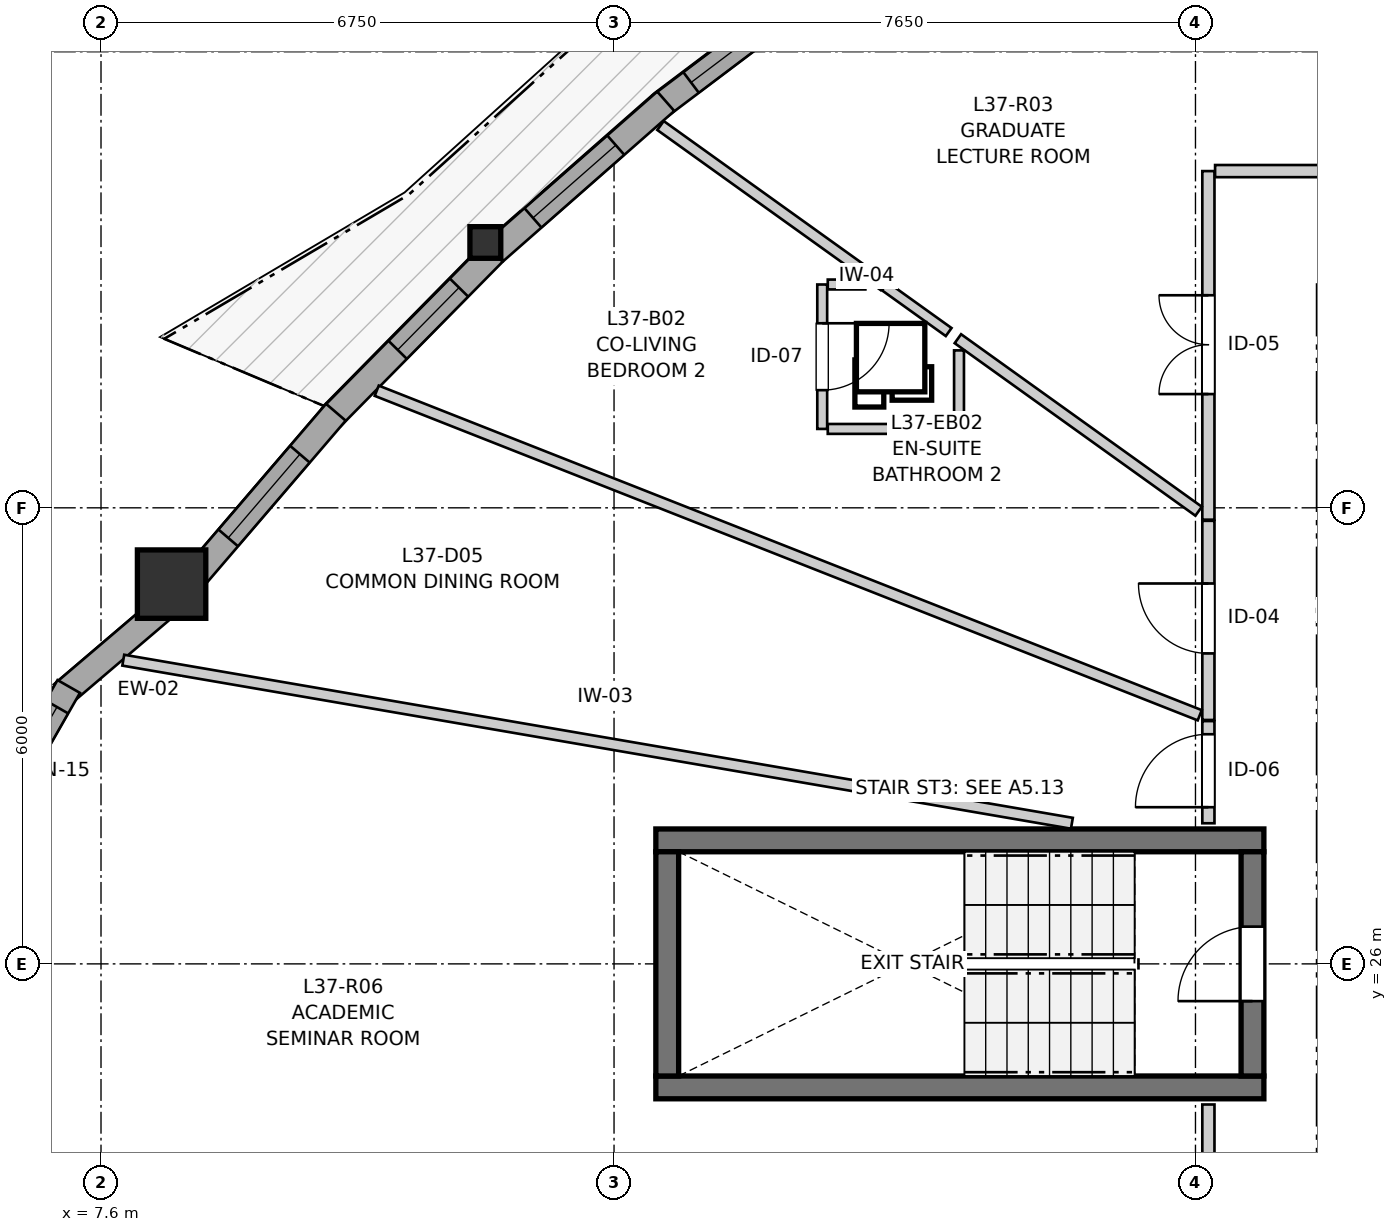
"""IFC4 building model, lengths in metres.
Left out: names, types, materials, properties, quantities, classifications, styles, units other than length and angle.
Written with IfcOpenShell. Run it as: python <this file> out.ifc"""

import sys

from ifc_helpers import new_model, si_unit, direction, frame, frame_2d, origin, origin_2d, place, context, subcontext, project, spatial, rectangle, i_section, extrude, source, transform, mapped, element, fill, save


model = new_model("IFC4")
c1 = context("Model", 3, precision=1e-05, world=origin(), true_north=direction((0.0, 1.0)))
c2 = subcontext(c1, "Body", "Model", "MODEL_VIEW")
j1 = project(units=[si_unit("LENGTHUNIT", "METRE"), si_unit("PLANEANGLEUNIT", "RADIAN")], contexts=[c1])
p1 = place(None, origin())
s1 = spatial("IfcSite", under=j1, at=p1, CompositionType="ELEMENT")
p2 = place(p1, origin())
s2 = spatial("IfcBuilding", under=s1, at=p2, CompositionType="ELEMENT")
p3 = place(p2, frame((0.0, 0.0, 124.8)))
s3 = spatial("IfcBuildingStorey", under=s2, at=p3, CompositionType="ELEMENT", Elevation=124.8)
for number, where, z_axis, x_axis in (
    (1, (14.9, 24.375, 0.0), (0.0, 0.0, 1.0), (1.0, 0.0, 0.0)),
    (2, (22.9, 27.625, 0.0), (0.0, 0.0, 1.0), (-1.0, 0.0, 0.0)),
):
    element("IfcWall", number, at=place(p3, frame(where, z_axis=z_axis, x_axis=x_axis)), inside=s3, PredefinedType="SHEAR", context=c2, shape_type="SweptSolid", body=[
        extrude(rectangle(XDim=8.0, YDim=0.3, at=frame_2d((4.0, 0.0))), origin(), (0.0, 0.0, 1.0), 2.9),
    ])
p4 = place(p3, frame((15.05, 27.475, 0.0), z_axis=(0.0, 0.0, 1.0), x_axis=(0.0, -1.0, 0.0)))
e3 = element("IfcWall", 3, at=p4, inside=s3, PredefinedType="SHEAR", context=c2, shape_type="SweptSolid", body=[
    extrude(rectangle(XDim=2.95, YDim=0.3, at=frame_2d((1.475, 0.0))), origin(), (0.0, 0.0, 1.0), 2.9),
])
p5 = place(p3, frame((22.75, 24.525, 0.0), z_axis=(0.0, 0.0, 1.0), x_axis=(0.0, 1.0, 0.0)))
e4 = element("IfcWall", 4, at=p5, inside=s3, PredefinedType="SHEAR", context=c2, shape_type="SweptSolid", body=[
    extrude(rectangle(XDim=2.95, YDim=0.3, at=frame_2d((1.475, 0.0))), origin(), (0.0, 0.0, 1.0), 2.9),
])
p6 = place(p5, frame((0.985, 0.0, 0.0)))
e5 = element("IfcOpeningElement", 5, at=p6, cuts=e4, PredefinedType="OPENING", context=c2, shape_type="SweptSolid", body=[
    extrude(rectangle(XDim=0.98, YDim=2.15, at=frame_2d((0.49, 1.075))), frame((0.0, 0.16, 0.0), z_axis=(0.0, -1.0, 0.0), x_axis=(1.0, 0.0, 0.0)), (0.0, 0.0, 1.0), 0.32),
])
m1 = source(origin(), c2, "Body", "SweptSolid", [
    extrude(rectangle(XDim=0.9, YDim=0.9, at=origin_2d()), origin(), (0.0, 0.0, 1.0), 2.9),
])
p7 = place(p3, frame((8.529, 30.996, 0.0), z_axis=(0.0, 0.0, 1.0), x_axis=(1.0, 0.0, 0.0)))
e6 = element("IfcColumn", 6, at=p7, inside=s3, PredefinedType="COLUMN", context=c2, shape_type="MappedRepresentation", body=[
    mapped(m1, transform((0.0, 0.0, 0.0), x_axis=(1.0, 0.0, 0.0), y_axis=(0.0, 1.0, 0.0), z_axis=(0.0, 0.0, 1.0), scale=1.0)),
])
m2 = source(origin(), c2, "Body", "SweptSolid", [
    extrude(i_section(OverallWidth=0.406, OverallDepth=0.416, WebThickness=0.027, FlangeThickness=0.044, FilletRadius=0.015, at=origin_2d()), origin(), (0.0, 0.0, 1.0), 2.9),
])
p8 = place(p3, frame((12.657, 35.491, 0.0), z_axis=(0.0, 0.0, 1.0), x_axis=(1.0, 0.0, 0.0)))
e7 = element("IfcColumn", 7, at=p8, inside=s3, PredefinedType="PILASTER", context=c2, shape_type="MappedRepresentation", body=[
    mapped(m2, transform((0.0, 0.0, 0.0), x_axis=(1.0, 0.0, 0.0), y_axis=(0.0, 1.0, 0.0), z_axis=(0.0, 0.0, 1.0), scale=1.0)),
])
p9 = place(p3, frame((8.464, 30.718, 0.0), z_axis=(0.0, 0.0, 1.0), x_axis=(-0.76120118347, -0.648515811899, 0.0)))
e8 = element("IfcWall", 8, at=p9, inside=s3, PredefinedType="SOLIDWALL", context=c2, shape_type="SweptSolid", body=[
    extrude(rectangle(XDim=1.805, YDim=0.34, at=frame_2d((0.902, 0.0))), origin(), (0.0, 0.0, 1.0), 2.43),
])
p10 = place(p3, frame((7.175, 29.65, 0.0), z_axis=(0.0, 0.0, 1.0), x_axis=(-0.495999400124, -0.868322863385, 0.0)))
e9 = element("IfcWall", 9, at=p10, inside=s3, PredefinedType="SOLIDWALL", context=c2, shape_type="SweptSolid", body=[
    extrude(rectangle(XDim=2.073, YDim=0.34, at=frame_2d((1.036, 0.0))), origin(), (0.0, 0.0, 1.0), 2.43),
])
p11 = place(p10, frame((0.311, 0.0, 0.82)))
e10 = element("IfcOpeningElement", 10, at=p11, cuts=e9, PredefinedType="OPENING", context=c2, shape_type="SweptSolid", body=[
    extrude(rectangle(XDim=1.45, YDim=1.25, at=frame_2d((0.725, 0.625))), frame((0.0, 0.18, 0.0), z_axis=(0.0, -1.0, 0.0), x_axis=(1.0, 0.0, 0.0)), (0.0, 0.0, 1.0), 0.36),
])
p12 = place(p3, frame((6.147, 24.15, 0.0), z_axis=(0.0, 0.0, 1.0), x_axis=(0.495999400124, -0.868322863385, 0.0)))
e11 = element("IfcWall", 11, at=p12, inside=s3, PredefinedType="SOLIDWALL", context=c2, shape_type="SweptSolid", body=[
    extrude(rectangle(XDim=2.073, YDim=0.34, at=frame_2d((1.036, 0.0))), origin(), (0.0, 0.0, 1.0), 2.43),
])
p13 = place(p12, frame((0.311, 0.0, 0.82)))
e12 = element("IfcOpeningElement", 12, at=p13, cuts=e11, PredefinedType="OPENING", context=c2, shape_type="SweptSolid", body=[
    extrude(rectangle(XDim=1.45, YDim=1.25, at=frame_2d((0.725, 0.625))), frame((0.0, 0.18, 0.0), z_axis=(0.0, -1.0, 0.0), x_axis=(1.0, 0.0, 0.0)), (0.0, 0.0, 1.0), 0.36),
])
p14 = place(p3, frame((17.154, 38.947, 0.0), z_axis=(0.0, 0.0, 1.0), x_axis=(-0.798332692302, -0.602216665663, 0.0)))
e13 = element("IfcWall", 13, at=p14, inside=s3, PredefinedType="SOLIDWALL", context=c2, shape_type="SweptSolid", body=[
    extrude(rectangle(XDim=2.746, YDim=0.34, at=frame_2d((1.373, 0.0))), origin(), (0.0, 0.0, 1.0), 2.43),
])
p15 = place(p14, frame((0.493, 0.0, 0.82)))
e14 = element("IfcOpeningElement", 14, at=p15, cuts=e13, PredefinedType="OPENING", context=c2, shape_type="SweptSolid", body=[
    extrude(rectangle(XDim=1.75, YDim=1.3, at=frame_2d((0.875, 0.65))), frame((0.0, 0.18, 0.0), z_axis=(0.0, -1.0, 0.0), x_axis=(1.0, 0.0, 0.0)), (0.0, 0.0, 1.0), 0.36),
])
p16 = place(p3, frame((15.031, 37.349, 0.0), z_axis=(0.0, 0.0, 1.0), x_axis=(-0.751472812955, -0.659764057364, 0.0)))
e15 = element("IfcWall", 15, at=p16, inside=s3, PredefinedType="SOLIDWALL", context=c2, shape_type="SweptSolid", body=[
    extrude(rectangle(XDim=2.99, YDim=0.34, at=frame_2d((1.495, 0.0))), origin(), (0.0, 0.0, 1.0), 2.43),
])
p17 = place(p16, frame((0.875, 0.0, 0.82)))
e16 = element("IfcOpeningElement", 16, at=p17, cuts=e15, PredefinedType="OPENING", context=c2, shape_type="SweptSolid", body=[
    extrude(rectangle(XDim=1.45, YDim=1.25, at=frame_2d((0.725, 0.625))), frame((0.0, 0.18, 0.0), z_axis=(0.0, -1.0, 0.0), x_axis=(1.0, 0.0, 0.0)), (0.0, 0.0, 1.0), 0.36),
])
p18 = place(p3, frame((12.764, 35.357, 0.0), z_axis=(0.0, 0.0, 1.0), x_axis=(-0.701906045867, -0.712269543625, 0.0)))
e17 = element("IfcWall", 17, at=p18, inside=s3, PredefinedType="SOLIDWALL", context=c2, shape_type="SweptSolid", body=[
    extrude(rectangle(XDim=3.039, YDim=0.34, at=frame_2d((1.52, 0.0))), origin(), (0.0, 0.0, 1.0), 2.43),
])
p19 = place(p18, frame((0.646, 0.0, 0.82)))
e18 = element("IfcOpeningElement", 18, at=p19, cuts=e17, PredefinedType="OPENING", context=c2, shape_type="SweptSolid", body=[
    extrude(rectangle(XDim=1.15, YDim=1.2, at=frame_2d((0.575, 0.6))), frame((0.0, 0.18, 0.0), z_axis=(0.0, -1.0, 0.0), x_axis=(1.0, 0.0, 0.0)), (0.0, 0.0, 1.0), 0.36),
])
p20 = place(p3, frame((10.69, 33.257, 0.0), z_axis=(0.0, 0.0, 1.0), x_axis=(-0.650763576187, -0.759280427714, 0.0)))
e19 = element("IfcWall", 19, at=p20, inside=s3, PredefinedType="SOLIDWALL", context=c2, shape_type="SweptSolid", body=[
    extrude(rectangle(XDim=2.893, YDim=0.34, at=frame_2d((1.447, 0.0))), origin(), (0.0, 0.0, 1.0), 2.43),
])
p21 = place(p20, frame((0.727, 0.0, 0.82)))
e20 = element("IfcOpeningElement", 20, at=p21, cuts=e19, PredefinedType="OPENING", context=c2, shape_type="SweptSolid", body=[
    extrude(rectangle(XDim=1.45, YDim=1.25, at=frame_2d((0.725, 0.625))), frame((0.0, 0.18, 0.0), z_axis=(0.0, -1.0, 0.0), x_axis=(1.0, 0.0, 0.0)), (0.0, 0.0, 1.0), 0.36),
])
p22 = place(p3, frame((22.17, 19.359, 0.0), z_axis=(0.0, 0.0, 1.0), x_axis=(0.0, 1.0, 0.0)))
e21 = element("IfcWall", 21, at=p22, inside=s3, PredefinedType="PARTITIONING", context=c2, shape_type="SweptSolid", body=[
    extrude(rectangle(XDim=4.791, YDim=0.16, at=frame_2d((2.396, 0.0))), origin(), (0.0, 0.0, 1.0), 2.9),
])
p23 = place(p22, frame((1.445, 0.0, 0.0)))
e22 = element("IfcOpeningElement", 22, at=p23, cuts=e21, PredefinedType="OPENING", context=c2, shape_type="SweptSolid", body=[
    extrude(rectangle(XDim=1.3, YDim=2.1, at=frame_2d((0.65, 1.05))), frame((0.0, 0.09, 0.0), z_axis=(0.0, -1.0, 0.0), x_axis=(1.0, 0.0, 0.0)), (0.0, 0.0, 1.0), 0.18),
])
p24 = place(p3, frame((22.17, 31.844, 0.0), z_axis=(0.0, 0.0, 1.0), x_axis=(0.0, 1.0, 0.0)))
e23 = element("IfcWall", 23, at=p24, inside=s3, PredefinedType="PARTITIONING", context=c2, shape_type="SweptSolid", body=[
    extrude(rectangle(XDim=4.586, YDim=0.16, at=frame_2d((2.293, 0.0))), origin(), (0.0, 0.0, 1.0), 2.9),
])
p25 = place(p24, frame((1.653, 0.0, 0.0)))
e24 = element("IfcOpeningElement", 24, at=p25, cuts=e23, PredefinedType="OPENING", context=c2, shape_type="SweptSolid", body=[
    extrude(rectangle(XDim=1.3, YDim=2.1, at=frame_2d((0.65, 1.05))), frame((0.0, 0.09, 0.0), z_axis=(0.0, -1.0, 0.0), x_axis=(1.0, 0.0, 0.0)), (0.0, 0.0, 1.0), 0.18),
])
p26 = place(p3, frame((22.17, 29.209, 0.0), z_axis=(0.0, 0.0, 1.0), x_axis=(0.0, 1.0, 0.0)))
e25 = element("IfcWall", 25, at=p26, inside=s3, PredefinedType="PARTITIONING", context=c2, shape_type="SweptSolid", body=[
    extrude(rectangle(XDim=2.62, YDim=0.16, at=frame_2d((1.31, 0.0))), origin(), (0.0, 0.0, 1.0), 2.9),
])
p27 = place(p26, frame((0.875, 0.0, 0.0)))
e26 = element("IfcOpeningElement", 26, at=p27, cuts=e25, PredefinedType="OPENING", context=c2, shape_type="SweptSolid", body=[
    extrude(rectangle(XDim=0.92, YDim=2.1, at=frame_2d((0.46, 1.05))), frame((0.0, 0.09, 0.0), z_axis=(0.0, -1.0, 0.0), x_axis=(1.0, 0.0, 0.0)), (0.0, 0.0, 1.0), 0.18),
])
p28 = place(p3, frame((17.089, 34.938, 0.0), z_axis=(0.0, 0.0, 1.0), x_axis=(0.0, -1.0, 0.0)))
e27 = element("IfcWall", 27, at=p28, inside=s3, PredefinedType="PARTITIONING", context=c2, shape_type="SweptSolid", body=[
    extrude(rectangle(XDim=1.9, YDim=0.13, at=frame_2d((0.95, 0.0))), origin(), (0.0, 0.0, 1.0), 2.9),
])
p29 = place(p28, frame((0.51, 0.0, 0.0)))
e28 = element("IfcOpeningElement", 28, at=p29, cuts=e27, PredefinedType="OPENING", context=c2, shape_type="SweptSolid", body=[
    extrude(rectangle(XDim=0.88, YDim=2.05, at=frame_2d((0.44, 1.025))), frame((0.0, 0.075, 0.0), z_axis=(0.0, -1.0, 0.0), x_axis=(1.0, 0.0, 0.0)), (0.0, 0.0, 1.0), 0.15),
])
p30 = place(p3, frame((22.17, 27.85, 0.0), z_axis=(0.0, 0.0, 1.0), x_axis=(0.0, 1.0, 0.0)))
e29 = element("IfcWall", 29, at=p30, inside=s3, PredefinedType="PARTITIONING", context=c2, shape_type="SweptSolid", body=[
    extrude(rectangle(XDim=1.344, YDim=0.16, at=frame_2d((0.672, 0.0))), origin(), (0.0, 0.0, 1.0), 2.9),
])
p31 = place(p30, frame((0.211, 0.0, 0.0)))
e30 = element("IfcOpeningElement", 30, at=p31, cuts=e29, PredefinedType="OPENING", context=c2, shape_type="SweptSolid", body=[
    extrude(rectangle(XDim=0.96, YDim=2.1, at=frame_2d((0.48, 1.05))), frame((0.0, 0.09, 0.0), z_axis=(0.0, -1.0, 0.0), x_axis=(1.0, 0.0, 0.0)), (0.0, 0.0, 1.0), 0.18),
])
p32 = place(p3, frame((7.893, 29.996, 0.0), z_axis=(0.0, 0.0, 1.0), x_axis=(0.985544917876, -0.169414328938, 0.0)))
e31 = element("IfcWall", 31, at=p32, inside=s3, PredefinedType="PARTITIONING", context=c2, shape_type="SweptSolid", body=[
    extrude(rectangle(XDim=12.664, YDim=0.145, at=frame_2d((6.332, 0.0))), origin(), (0.0, 0.0, 1.0), 2.9),
])
p33 = place(p3, frame((11.228, 33.54, 0.0), z_axis=(0.0, 0.0, 1.0), x_axis=(0.930301058265, -0.366796866114, 0.0)))
e32 = element("IfcWall", 32, at=p33, inside=s3, PredefinedType="PARTITIONING", context=c2, shape_type="SweptSolid", body=[
    extrude(rectangle(XDim=11.639, YDim=0.145, at=frame_2d((5.82, 0.0))), origin(), (0.0, 0.0, 1.0), 2.9),
])
p34 = place(p3, frame((22.258, 36.43, 0.0), z_axis=(0.0, 0.0, 1.0), x_axis=(1.0, 0.0, 0.0)))
e33 = element("IfcWall", 33, at=p34, inside=s3, PredefinedType="PARTITIONING", context=c2, shape_type="SweptSolid", body=[
    extrude(rectangle(XDim=4.074, YDim=0.16, at=frame_2d((2.037, 0.0))), origin(), (0.0, 0.0, 1.0), 2.538),
])
p35 = place(p3, frame((18.874, 34.225, 0.0), z_axis=(0.0, 0.0, 1.0), x_axis=(0.812826521731, -0.582505833079, 0.0)))
e34 = element("IfcWall", 34, at=p35, inside=s3, PredefinedType="PARTITIONING", context=c2, shape_type="SweptSolid", body=[
    extrude(rectangle(XDim=3.896, YDim=0.145, at=frame_2d((1.948, 0.0))), origin(), (0.0, 0.0, 1.0), 2.9),
])
p36 = place(p3, frame((14.961, 37.03, 0.0), z_axis=(0.0, 0.0, 1.0), x_axis=(0.812838437321, -0.582489205748, 0.0)))
e35 = element("IfcWall", 35, at=p36, inside=s3, PredefinedType="PARTITIONING", context=c2, shape_type="SweptSolid", body=[
    extrude(rectangle(XDim=3.616, YDim=0.145, at=frame_2d((1.808, 0.0))), origin(), (0.0, 0.0, 1.0), 2.9),
])
p37 = place(p3, frame((17.162, 33.038, 0.0), z_axis=(0.0, 0.0, 1.0), x_axis=(1.0, 0.0, 0.0)))
e36 = element("IfcWall", 36, at=p37, inside=s3, PredefinedType="PARTITIONING", context=c2, shape_type="SweptSolid", body=[
    extrude(rectangle(XDim=1.727, YDim=0.13, at=frame_2d((0.863, 0.0))), origin(), (0.0, 0.0, 1.0), 2.9),
])
p38 = place(p3, frame((18.889, 33.111, 0.0), z_axis=(0.0, 0.0, 1.0), x_axis=(0.0, 1.0, 0.0)))
e37 = element("IfcWall", 37, at=p38, inside=s3, PredefinedType="PARTITIONING", context=c2, shape_type="SweptSolid", body=[
    extrude(rectangle(XDim=0.96, YDim=0.13, at=frame_2d((0.48, 0.0))), origin(), (0.0, 0.0, 1.0), 2.9),
])
p39 = place(p3, frame((17.913, 34.914, 0.0), z_axis=(0.0, 0.0, 1.0), x_axis=(0.812774229327, -0.582578794792, 0.0)))
e38 = element("IfcWall", 38, at=p39, inside=s3, PredefinedType="PARTITIONING", context=c2, shape_type="SweptSolid", body=[
    extrude(rectangle(XDim=1.033, YDim=0.13, at=frame_2d((0.517, 0.0))), origin(), (0.0, 0.0, 1.0), 2.9),
])
p40 = place(p3, frame((17.162, 34.938, 0.0), z_axis=(0.0, 0.0, 1.0), x_axis=(1.0, 0.0, 0.0)))
e39 = element("IfcWall", 39, at=p40, inside=s3, PredefinedType="PARTITIONING", context=c2, shape_type="SweptSolid", body=[
    extrude(rectangle(XDim=0.495, YDim=0.13, at=frame_2d((0.247, 0.0))), origin(), (0.0, 0.0, 1.0), 2.9),
])
m3 = source(origin(), c2, "Body", "SweptSolid", [
    extrude(rectangle(XDim=1.45, YDim=1.25, at=frame_2d((0.725, 0.625))), frame((0.0, 0.03, 0.0), z_axis=(0.0, -1.0, 0.0), x_axis=(1.0, 0.0, 0.0)), (0.0, 0.0, 1.0), 0.06),
])
p41 = place(p11, origin())
e40 = element("IfcWindow", 40, at=p41, inside=s3, PartitioningType="SINGLE_PANEL", PredefinedType="WINDOW", context=c2, shape_type="MappedRepresentation", body=[
    mapped(m3, transform((0.0, 0.0, 0.0), x_axis=(1.0, 0.0, 0.0), y_axis=(0.0, 1.0, 0.0), z_axis=(0.0, 0.0, 1.0), scale=1.0)),
])
fill(e10, e40)
p42 = place(p13, origin())
e41 = element("IfcWindow", 41, at=p42, inside=s3, PartitioningType="SINGLE_PANEL", PredefinedType="WINDOW", context=c2, shape_type="MappedRepresentation", body=[
    mapped(m3, transform((0.0, 0.0, 0.0), x_axis=(1.0, 0.0, 0.0), y_axis=(0.0, 1.0, 0.0), z_axis=(0.0, 0.0, 1.0), scale=1.0)),
])
fill(e12, e41)
m4 = source(origin(), c2, "Body", "SweptSolid", [
    extrude(rectangle(XDim=1.75, YDim=1.3, at=frame_2d((0.875, 0.65))), frame((0.0, 0.03, 0.0), z_axis=(0.0, -1.0, 0.0), x_axis=(1.0, 0.0, 0.0)), (0.0, 0.0, 1.0), 0.06),
])
p43 = place(p15, origin())
e42 = element("IfcWindow", 42, at=p43, inside=s3, PartitioningType="SINGLE_PANEL", PredefinedType="WINDOW", context=c2, shape_type="MappedRepresentation", body=[
    mapped(m4, transform((0.0, 0.0, 0.0), x_axis=(1.0, 0.0, 0.0), y_axis=(0.0, 1.0, 0.0), z_axis=(0.0, 0.0, 1.0), scale=1.0)),
])
fill(e14, e42)
p44 = place(p17, origin())
e43 = element("IfcWindow", 43, at=p44, inside=s3, PartitioningType="SINGLE_PANEL", PredefinedType="WINDOW", context=c2, shape_type="MappedRepresentation", body=[
    mapped(m3, transform((0.0, 0.0, 0.0), x_axis=(1.0, 0.0, 0.0), y_axis=(0.0, 1.0, 0.0), z_axis=(0.0, 0.0, 1.0), scale=1.0)),
])
fill(e16, e43)
m5 = source(origin(), c2, "Body", "SweptSolid", [
    extrude(rectangle(XDim=1.15, YDim=1.2, at=frame_2d((0.575, 0.6))), frame((0.0, 0.03, 0.0), z_axis=(0.0, -1.0, 0.0), x_axis=(1.0, 0.0, 0.0)), (0.0, 0.0, 1.0), 0.06),
])
p45 = place(p19, origin())
e44 = element("IfcWindow", 44, at=p45, inside=s3, PartitioningType="SINGLE_PANEL", PredefinedType="WINDOW", context=c2, shape_type="MappedRepresentation", body=[
    mapped(m5, transform((0.0, 0.0, 0.0), x_axis=(1.0, 0.0, 0.0), y_axis=(0.0, 1.0, 0.0), z_axis=(0.0, 0.0, 1.0), scale=1.0)),
])
fill(e18, e44)
p46 = place(p21, origin())
e45 = element("IfcWindow", 45, at=p46, inside=s3, PartitioningType="SINGLE_PANEL", PredefinedType="WINDOW", context=c2, shape_type="MappedRepresentation", body=[
    mapped(m3, transform((0.0, 0.0, 0.0), x_axis=(1.0, 0.0, 0.0), y_axis=(0.0, 1.0, 0.0), z_axis=(0.0, 0.0, 1.0), scale=1.0)),
])
fill(e20, e45)
m6 = source(origin(), c2, "Body", "SweptSolid", [
    extrude(rectangle(XDim=0.98, YDim=2.15, at=frame_2d((0.49, 1.075))), frame((0.0, 0.025, 0.0), z_axis=(0.0, -1.0, 0.0), x_axis=(1.0, 0.0, 0.0)), (0.0, 0.0, 1.0), 0.05),
])
p47 = place(p6, origin())
e46 = element("IfcDoor", 46, at=p47, inside=s3, OperationType="SINGLE_SWING_LEFT", PredefinedType="DOOR", context=c2, shape_type="MappedRepresentation", body=[
    mapped(m6, transform((0.0, 0.0, 0.0), x_axis=(1.0, 0.0, 0.0), y_axis=(0.0, 1.0, 0.0), z_axis=(0.0, 0.0, 1.0), scale=1.0)),
])
fill(e5, e46)
m7 = source(origin(), c2, "Body", "SweptSolid", [
    extrude(rectangle(XDim=1.3, YDim=2.1, at=frame_2d((0.65, 1.05))), frame((0.0, 0.025, 0.0), z_axis=(0.0, -1.0, 0.0), x_axis=(1.0, 0.0, 0.0)), (0.0, 0.0, 1.0), 0.05),
])
p48 = place(p25, origin())
e47 = element("IfcDoor", 47, at=p48, inside=s3, OperationType="DOUBLE_DOOR_SINGLE_SWING", PredefinedType="DOOR", context=c2, shape_type="MappedRepresentation", body=[
    mapped(m7, transform((0.0, 0.0, 0.0), x_axis=(1.0, 0.0, 0.0), y_axis=(0.0, 1.0, 0.0), z_axis=(0.0, 0.0, 1.0), scale=1.0)),
])
fill(e24, e47)
m8 = source(origin(), c2, "Body", "SweptSolid", [
    extrude(rectangle(XDim=0.92, YDim=2.1, at=frame_2d((0.46, 1.05))), frame((0.0, 0.025, 0.0), z_axis=(0.0, -1.0, 0.0), x_axis=(1.0, 0.0, 0.0)), (0.0, 0.0, 1.0), 0.05),
])
p49 = place(p27, origin())
e48 = element("IfcDoor", 48, at=p49, inside=s3, OperationType="SINGLE_SWING_RIGHT", PredefinedType="DOOR", context=c2, shape_type="MappedRepresentation", body=[
    mapped(m8, transform((0.0, 0.0, 0.0), x_axis=(1.0, 0.0, 0.0), y_axis=(0.0, 1.0, 0.0), z_axis=(0.0, 0.0, 1.0), scale=1.0)),
])
fill(e26, e48)
m9 = source(origin(), c2, "Body", "SweptSolid", [
    extrude(rectangle(XDim=0.88, YDim=2.05, at=frame_2d((0.44, 1.025))), frame((0.0, 0.025, 0.0), z_axis=(0.0, -1.0, 0.0), x_axis=(1.0, 0.0, 0.0)), (0.0, 0.0, 1.0), 0.05),
])
p50 = place(p29, origin())
e49 = element("IfcDoor", 49, at=p50, inside=s3, OperationType="SINGLE_SWING_LEFT", PredefinedType="DOOR", context=c2, shape_type="MappedRepresentation", body=[
    mapped(m9, transform((0.0, 0.0, 0.0), x_axis=(1.0, 0.0, 0.0), y_axis=(0.0, 1.0, 0.0), z_axis=(0.0, 0.0, 1.0), scale=1.0)),
])
fill(e28, e49)
m10 = source(origin(), c2, "Body", "SweptSolid", [
    extrude(rectangle(XDim=0.96, YDim=2.1, at=frame_2d((0.48, 1.05))), frame((0.0, 0.025, 0.0), z_axis=(0.0, -1.0, 0.0), x_axis=(1.0, 0.0, 0.0)), (0.0, 0.0, 1.0), 0.05),
])
p51 = place(p31, origin())
e50 = element("IfcDoor", 50, at=p51, inside=s3, OperationType="SINGLE_SWING_LEFT", PredefinedType="DOOR", context=c2, shape_type="MappedRepresentation", body=[
    mapped(m10, transform((0.0, 0.0, 0.0), x_axis=(1.0, 0.0, 0.0), y_axis=(0.0, 1.0, 0.0), z_axis=(0.0, 0.0, 1.0), scale=1.0)),
])
fill(e30, e50)
save(model, sys.argv[1])
